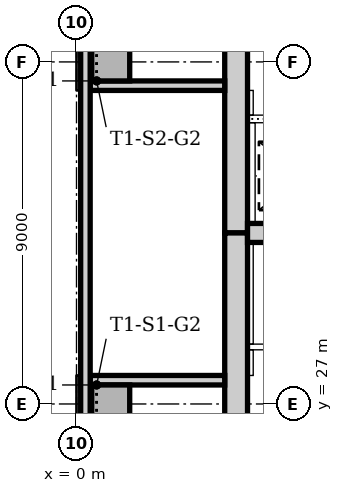
"""IFC4 building model, lengths in metres.
Left out: names, types, materials, properties, quantities, classifications, styles, units other than length and angle.
Written with IfcOpenShell. Run it as: python <this file> out.ifc"""

import sys

from ifc_helpers import new_model, si_unit, direction, frame, frame_2d, origin, origin_2d, place, context, subcontext, project, spatial, rectangle, extrude, element, fill, save


model = new_model("IFC4")
c1 = context("Model", 3, precision=1e-05, world=origin(), true_north=direction((0.0, 1.0)))
c2 = subcontext(c1, "Body", "Model", "MODEL_VIEW")
j1 = project(units=[si_unit("LENGTHUNIT", "METRE"), si_unit("PLANEANGLEUNIT", "RADIAN")], contexts=[c1])
p1 = place(None, origin())
s1 = spatial("IfcSite", under=j1, at=p1, CompositionType="ELEMENT")
p2 = place(p1, origin())
s2 = spatial("IfcBuilding", under=s1, at=p2, CompositionType="ELEMENT")
p3 = place(p2, origin())
s3 = spatial("IfcBuildingStorey", under=s2, at=p3, CompositionType="ELEMENT", Elevation=0.0)
p4 = place(p3, frame((4.2, 42.0, 0.0), z_axis=(0.0, 0.0, 1.0), x_axis=(0.0, -1.0, 0.0)))
e1 = element("IfcWall", 1, at=p4, inside=s3, PredefinedType="SOLIDWALL", context=c2, shape_type="SweptSolid", body=[
    extrude(rectangle(XDim=10.5, YDim=0.6, at=frame_2d((5.25, 0.0))), origin(), (0.0, 0.0, 1.0), 6.0),
])
p5 = place(p4, frame((5.3, 0.0, 0.0)))
e2 = element("IfcOpeningElement", 2, at=p5, cuts=e1, PredefinedType="OPENING", context=c2, shape_type="SweptSolid", body=[
    extrude(rectangle(XDim=1.0, YDim=2.1, at=frame_2d((0.5, 1.05))), frame((0.0, 0.31, 0.0), z_axis=(0.0, -1.0, 0.0), x_axis=(1.0, 0.0, 0.0)), (0.0, 0.0, 1.0), 0.62),
])
p6 = place(p3, frame((4.2, 31.5, 0.0), z_axis=(0.0, 0.0, 1.0), x_axis=(0.0, -1.0, 0.0)))
e3 = element("IfcWall", 3, at=p6, inside=s3, PredefinedType="SOLIDWALL", context=c2, shape_type="SweptSolid", body=[
    extrude(rectangle(XDim=10.5, YDim=0.6, at=frame_2d((5.25, 0.0))), origin(), (0.0, 0.0, 1.0), 6.0),
])
p7 = place(p6, frame((4.25, 0.0, 0.0)))
e4 = element("IfcOpeningElement", 4, at=p7, cuts=e3, PredefinedType="OPENING", context=c2, shape_type="SweptSolid", body=[
    extrude(rectangle(XDim=1.0, YDim=2.1, at=frame_2d((0.5, 1.05))), frame((0.0, 0.31, 0.0), z_axis=(0.0, -1.0, 0.0), x_axis=(1.0, 0.0, 0.0)), (0.0, 0.0, 1.0), 0.62),
])
p8 = place(p3, frame((4.5, 31.5, 0.0), z_axis=(0.0, 0.0, 1.0), x_axis=(1.0, 0.0, 0.0)))
e5 = element("IfcWall", 5, at=p8, inside=s3, PredefinedType="SOLIDWALL", context=c2, shape_type="SweptSolid", body=[
    extrude(rectangle(XDim=18.0, YDim=0.5, at=frame_2d((9.0, 0.0))), origin(), (0.0, 0.0, 1.0), 6.0),
])
p9 = place(p3, frame((3.9, 27.625, 0.0), z_axis=(0.0, 0.0, 1.0), x_axis=(-1.0, 0.0, 0.0)))
e6 = element("IfcWall", 6, at=p9, inside=s3, PredefinedType="SOLIDWALL", context=c2, shape_type="SweptSolid", body=[
    extrude(rectangle(XDim=3.54, YDim=0.25, at=frame_2d((1.77, 0.0))), origin(), (0.0, 0.0, 1.0), 6.0),
])
p10 = place(p9, frame((0.4, 0.0, 0.0)))
e7 = element("IfcOpeningElement", 7, at=p10, cuts=e6, PredefinedType="OPENING", context=c2, shape_type="SweptSolid", body=[
    extrude(rectangle(XDim=1.0, YDim=2.1, at=frame_2d((0.5, 1.05))), frame((0.0, 0.135, 0.0), z_axis=(0.0, -1.0, 0.0), x_axis=(1.0, 0.0, 0.0)), (0.0, 0.0, 1.0), 0.27),
])
p11 = place(p3, frame((0.36, 35.375, 0.0), z_axis=(0.0, 0.0, 1.0), x_axis=(1.0, 0.0, 0.0)))
e8 = element("IfcWall", 8, at=p11, inside=s3, PredefinedType="SOLIDWALL", context=c2, shape_type="SweptSolid", body=[
    extrude(rectangle(XDim=3.54, YDim=0.25, at=frame_2d((1.77, 0.0))), origin(), (0.0, 0.0, 1.0), 6.0),
])
p12 = place(p11, frame((2.14, 0.0, 0.0)))
e9 = element("IfcOpeningElement", 9, at=p12, cuts=e8, PredefinedType="OPENING", context=c2, shape_type="SweptSolid", body=[
    extrude(rectangle(XDim=1.0, YDim=2.1, at=frame_2d((0.5, 1.05))), frame((0.0, 0.135, 0.0), z_axis=(0.0, -1.0, 0.0), x_axis=(1.0, 0.0, 0.0)), (0.0, 0.0, 1.0), 0.27),
])
p13 = place(p3, frame((0.235, 21.0, 0.0), z_axis=(0.0, 0.0, 1.0), x_axis=(0.0, 1.0, 0.0)))
e10 = element("IfcWall", 10, at=p13, inside=s3, PredefinedType="SOLIDWALL", context=c2, shape_type="SweptSolid", body=[
    extrude(rectangle(XDim=21.0, YDim=0.25, at=frame_2d((10.5, 0.0))), origin(), (0.0, 0.0, 1.0), 6.0),
])
p14 = place(p13, frame((10.0, 0.0, 0.0)))
e11 = element("IfcOpeningElement", 11, at=p14, cuts=e10, PredefinedType="OPENING", context=c2, shape_type="SweptSolid", body=[
    extrude(rectangle(XDim=1.0, YDim=2.1, at=frame_2d((0.5, 1.05))), frame((0.0, 0.135, 0.0), z_axis=(0.0, -1.0, 0.0), x_axis=(1.0, 0.0, 0.0)), (0.0, 0.0, 1.0), 0.27),
])
for number, where, z_axis, x_axis in (
    (12, (0.9, 27.0, 0.0), (0.0, 0.0, 1.0), (1.0, 0.0, 0.0)),
    (13, (0.9, 36.0, 0.0), (0.0, 0.0, 1.0), (1.0, 0.0, 0.0)),
):
    element("IfcColumn", number, at=place(p3, frame(where, z_axis=z_axis, x_axis=x_axis)), inside=s3, PredefinedType="COLUMN", context=c2, shape_type="SweptSolid", body=[
        extrude(rectangle(XDim=1.0, YDim=1.0, at=origin_2d()), origin(), (0.0, 0.0, 1.0), 6.0),
    ])
p15 = place(p3, frame((4.5, 34.5, 0.0), z_axis=(0.0, 0.0, 1.0), x_axis=(1.0, 0.0, 0.0)))
e14 = element("IfcWall", 14, at=p15, inside=s3, PredefinedType="PARTITIONING", context=c2, shape_type="SweptSolid", body=[
    extrude(rectangle(XDim=18.0, YDim=0.2, at=frame_2d((9.0, 0.0))), origin(), (0.0, 0.0, 1.0), 5.7),
])
p16 = place(p15, frame((0.95, 0.0, 0.0)))
e15 = element("IfcOpeningElement", 15, at=p16, cuts=e14, PredefinedType="OPENING", context=c2, shape_type="SweptSolid", body=[
    extrude(rectangle(XDim=1.1, YDim=2.1, at=frame_2d((0.55, 1.05))), frame((0.0, 0.11, 0.0), z_axis=(0.0, -1.0, 0.0), x_axis=(1.0, 0.0, 0.0)), (0.0, 0.0, 1.0), 0.22),
])
p17 = place(p15, frame((3.95, 0.0, 0.0)))
e16 = element("IfcOpeningElement", 16, at=p17, cuts=e14, PredefinedType="OPENING", context=c2, shape_type="SweptSolid", body=[
    extrude(rectangle(XDim=1.1, YDim=2.1, at=frame_2d((0.55, 1.05))), frame((0.0, 0.11, 0.0), z_axis=(0.0, -1.0, 0.0), x_axis=(1.0, 0.0, 0.0)), (0.0, 0.0, 1.0), 0.22),
])
p18 = place(p15, frame((6.95, 0.0, 0.0)))
e17 = element("IfcOpeningElement", 17, at=p18, cuts=e14, PredefinedType="OPENING", context=c2, shape_type="SweptSolid", body=[
    extrude(rectangle(XDim=1.1, YDim=2.1, at=frame_2d((0.55, 1.05))), frame((0.0, 0.11, 0.0), z_axis=(0.0, -1.0, 0.0), x_axis=(1.0, 0.0, 0.0)), (0.0, 0.0, 1.0), 0.22),
])
p19 = place(p15, frame((9.95, 0.0, 0.0)))
e18 = element("IfcOpeningElement", 18, at=p19, cuts=e14, PredefinedType="OPENING", context=c2, shape_type="SweptSolid", body=[
    extrude(rectangle(XDim=1.1, YDim=2.1, at=frame_2d((0.55, 1.05))), frame((0.0, 0.11, 0.0), z_axis=(0.0, -1.0, 0.0), x_axis=(1.0, 0.0, 0.0)), (0.0, 0.0, 1.0), 0.22),
])
p20 = place(p15, frame((12.95, 0.0, 0.0)))
e19 = element("IfcOpeningElement", 19, at=p20, cuts=e14, PredefinedType="OPENING", context=c2, shape_type="SweptSolid", body=[
    extrude(rectangle(XDim=1.1, YDim=2.1, at=frame_2d((0.55, 1.05))), frame((0.0, 0.11, 0.0), z_axis=(0.0, -1.0, 0.0), x_axis=(1.0, 0.0, 0.0)), (0.0, 0.0, 1.0), 0.22),
])
p21 = place(p15, frame((15.95, 0.0, 0.0)))
e20 = element("IfcOpeningElement", 20, at=p21, cuts=e14, PredefinedType="OPENING", context=c2, shape_type="SweptSolid", body=[
    extrude(rectangle(XDim=1.1, YDim=2.1, at=frame_2d((0.55, 1.05))), frame((0.0, 0.11, 0.0), z_axis=(0.0, -1.0, 0.0), x_axis=(1.0, 0.0, 0.0)), (0.0, 0.0, 1.0), 0.22),
])
p22 = place(p3, frame((4.6, 31.75, 0.0), z_axis=(0.0, 0.0, 1.0), x_axis=(0.0, 1.0, 0.0)))
e21 = element("IfcWall", 21, at=p22, inside=s3, PredefinedType="PARTITIONING", context=c2, shape_type="SweptSolid", body=[
    extrude(rectangle(XDim=2.65, YDim=0.2, at=frame_2d((1.325, 0.0))), origin(), (0.0, 0.0, 1.0), 5.7),
])
p23 = place(p3, frame((4.5, 28.5, 0.0), z_axis=(0.0, 0.0, 1.0), x_axis=(1.0, 0.0, 0.0)))
e22 = element("IfcWall", 22, at=p23, inside=s3, PredefinedType="PARTITIONING", context=c2, shape_type="SweptSolid", body=[
    extrude(rectangle(XDim=18.0, YDim=0.15, at=frame_2d((9.0, 0.0))), origin(), (0.0, 0.0, 1.0), 5.7),
])
p24 = place(p23, frame((4.1, 0.0, 0.0)))
e23 = element("IfcOpeningElement", 23, at=p24, cuts=e22, PredefinedType="OPENING", context=c2, shape_type="SweptSolid", body=[
    extrude(rectangle(XDim=0.9, YDim=2.1, at=frame_2d((0.45, 1.05))), frame((0.0, 0.085, 0.0), z_axis=(0.0, -1.0, 0.0), x_axis=(1.0, 0.0, 0.0)), (0.0, 0.0, 1.0), 0.17),
])
p25 = place(p23, frame((10.8, 0.0, 0.0)))
e24 = element("IfcOpeningElement", 24, at=p25, cuts=e22, PredefinedType="OPENING", context=c2, shape_type="SweptSolid", body=[
    extrude(rectangle(XDim=0.9, YDim=2.1, at=frame_2d((0.45, 1.05))), frame((0.0, 0.085, 0.0), z_axis=(0.0, -1.0, 0.0), x_axis=(1.0, 0.0, 0.0)), (0.0, 0.0, 1.0), 0.17),
])
p26 = place(p23, frame((15.2, 0.0, 0.0)))
e25 = element("IfcOpeningElement", 25, at=p26, cuts=e22, PredefinedType="OPENING", context=c2, shape_type="SweptSolid", body=[
    extrude(rectangle(XDim=0.9, YDim=2.1, at=frame_2d((0.45, 1.05))), frame((0.0, 0.085, 0.0), z_axis=(0.0, -1.0, 0.0), x_axis=(1.0, 0.0, 0.0)), (0.0, 0.0, 1.0), 0.17),
])
p27 = place(p3, frame((4.575, 27.75, 0.0), z_axis=(0.0, 0.0, 1.0), x_axis=(0.0, 1.0, 0.0)))
e26 = element("IfcWall", 26, at=p27, inside=s3, PredefinedType="PARTITIONING", context=c2, shape_type="SweptSolid", body=[
    extrude(rectangle(XDim=0.675, YDim=0.15, at=frame_2d((0.338, 0.0))), origin(), (0.0, 0.0, 1.0), 5.7),
])
p28 = place(p3, frame((4.575, 28.575, 0.0), z_axis=(0.0, 0.0, 1.0), x_axis=(0.0, 1.0, 0.0)))
e27 = element("IfcWall", 27, at=p28, inside=s3, PredefinedType="PARTITIONING", context=c2, shape_type="SweptSolid", body=[
    extrude(rectangle(XDim=2.675, YDim=0.15, at=frame_2d((1.337, 0.0))), origin(), (0.0, 0.0, 1.0), 5.7),
])
p29 = place(p3, frame((4.575, 34.6, 0.0), z_axis=(0.0, 0.0, 1.0), x_axis=(0.0, 1.0, 0.0)))
e28 = element("IfcWall", 28, at=p29, inside=s3, PredefinedType="PARTITIONING", context=c2, shape_type="SweptSolid", body=[
    extrude(rectangle(XDim=0.65, YDim=0.15, at=frame_2d((0.325, 0.0))), origin(), (0.0, 0.0, 1.0), 5.7),
])
p30 = place(p7, frame((1.0, 0.0, 0.0), z_axis=(0.0, 0.0, 1.0), x_axis=(-1.0, 0.0, 0.0)))
e29 = element("IfcDoor", 29, at=p30, inside=s3, OperationType="SINGLE_SWING_RIGHT", PredefinedType="DOOR", context=c2, shape_type="SweptSolid", body=[
    extrude(rectangle(XDim=1.0, YDim=2.1, at=frame_2d((0.5, 1.05))), frame((0.0, 0.025, 0.0), z_axis=(0.0, -1.0, 0.0), x_axis=(1.0, 0.0, 0.0)), (0.0, 0.0, 1.0), 0.05),
])
fill(e4, e29)
p31 = place(p10, origin())
e30 = element("IfcDoor", 30, at=p31, inside=s3, OperationType="SINGLE_SWING_LEFT", PredefinedType="DOOR", context=c2, shape_type="SweptSolid", body=[
    extrude(rectangle(XDim=1.0, YDim=2.1, at=frame_2d((0.5, 1.05))), frame((0.0, 0.025, 0.0), z_axis=(0.0, -1.0, 0.0), x_axis=(1.0, 0.0, 0.0)), (0.0, 0.0, 1.0), 0.05),
])
fill(e7, e30)
p32 = place(p5, frame((1.0, 0.0, 0.0), z_axis=(0.0, 0.0, 1.0), x_axis=(-1.0, 0.0, 0.0)))
e31 = element("IfcDoor", 31, at=p32, inside=s3, OperationType="SINGLE_SWING_LEFT", PredefinedType="DOOR", context=c2, shape_type="SweptSolid", body=[
    extrude(rectangle(XDim=1.0, YDim=2.1, at=frame_2d((0.5, 1.05))), frame((0.0, 0.025, 0.0), z_axis=(0.0, -1.0, 0.0), x_axis=(1.0, 0.0, 0.0)), (0.0, 0.0, 1.0), 0.05),
])
fill(e2, e31)
p33 = place(p12, origin())
e32 = element("IfcDoor", 32, at=p33, inside=s3, OperationType="SINGLE_SWING_RIGHT", PredefinedType="DOOR", context=c2, shape_type="SweptSolid", body=[
    extrude(rectangle(XDim=1.0, YDim=2.1, at=frame_2d((0.5, 1.05))), frame((0.0, 0.025, 0.0), z_axis=(0.0, -1.0, 0.0), x_axis=(1.0, 0.0, 0.0)), (0.0, 0.0, 1.0), 0.05),
])
fill(e9, e32)
p34 = place(p14, origin())
e33 = element("IfcDoor", 33, at=p34, inside=s3, OperationType="SINGLE_SWING_RIGHT", PredefinedType="DOOR", context=c2, shape_type="SweptSolid", body=[
    extrude(rectangle(XDim=1.0, YDim=2.1, at=frame_2d((0.5, 1.05))), frame((0.0, 0.025, 0.0), z_axis=(0.0, -1.0, 0.0), x_axis=(1.0, 0.0, 0.0)), (0.0, 0.0, 1.0), 0.05),
])
fill(e11, e33)
save(model, sys.argv[1])
